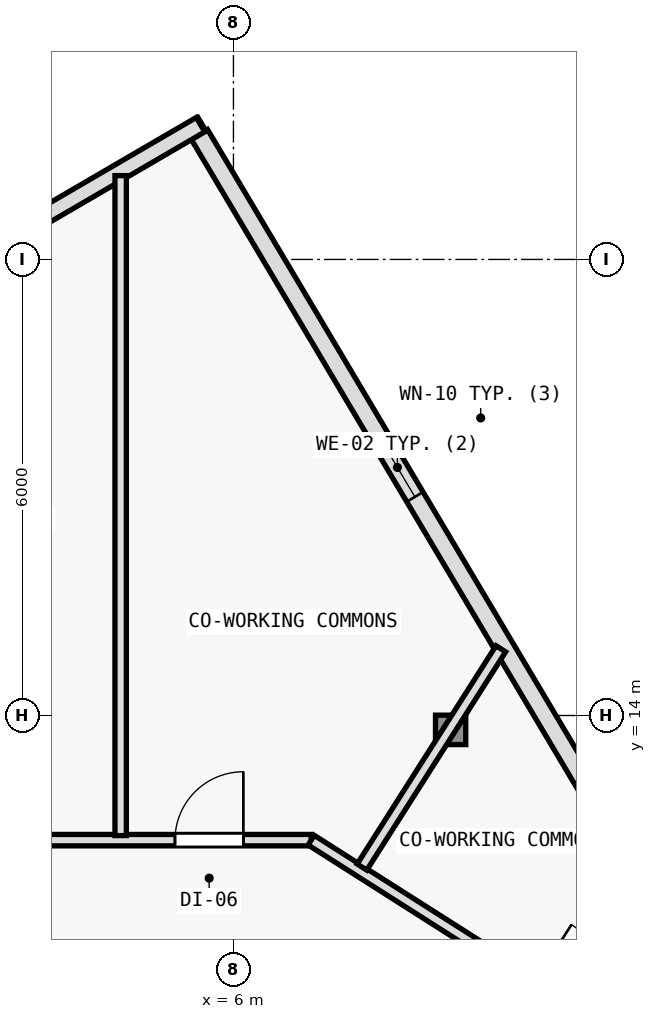
"""IFC4 building model, lengths in metres.
Left out: names, types, materials, properties, quantities, classifications, styles, units other than length and angle.
Written with IfcOpenShell. Run it as: python <this file> out.ifc"""

import sys

from ifc_helpers import new_model, si_unit, direction, frame, frame_2d, origin, origin_2d, place, context, subcontext, project, spatial, rectangle, i_section, extrude, element, fill, save


model = new_model("IFC4")
c1 = context("Model", 3, precision=1e-05, world=origin(), true_north=direction((0.0, 1.0)))
c2 = subcontext(c1, "Body", "Model", "MODEL_VIEW")
j1 = project(units=[si_unit("LENGTHUNIT", "METRE"), si_unit("PLANEANGLEUNIT", "RADIAN")], contexts=[c1])
p1 = place(None, origin())
s1 = spatial("IfcSite", under=j1, at=p1, CompositionType="ELEMENT")
p2 = place(p1, origin())
s2 = spatial("IfcBuilding", under=s1, at=p2, CompositionType="ELEMENT")
p3 = place(p2, frame((0.0, 0.0, 205.5)))
s3 = spatial("IfcBuildingStorey", under=s2, at=p3, CompositionType="ELEMENT", Elevation=205.5)
p4 = place(p3, frame((8.857, 13.811, 0.006), z_axis=(-0.011699840322, -0.002584848443, 0.999928213571), x_axis=(0.215728093413, -0.976453475447, 0.0)))
e1 = element("IfcColumn", 1, at=p4, inside=s3, PredefinedType="COLUMN", context=c2, shape_type="SweptSolid", body=[
    extrude(i_section(OverallWidth=0.398, OverallDepth=0.387, WebThickness=0.013, FlangeThickness=0.022, FilletRadius=0.015, at=origin_2d()), origin(), (0.0, 0.0, 1.0), 3.589),
])
p5 = place(p3, frame((5.551, 21.647, 0.0), z_axis=(0.0, 0.0, 1.0), x_axis=(0.511094988088, -0.859524236512, 0.0)))
e2 = element("IfcWall", 2, at=p5, inside=s3, PredefinedType="SOLIDWALL", context=c2, shape_type="SweptSolid", body=[
    extrude(rectangle(XDim=10.2, YDim=0.25, at=frame_2d((5.1, 0.0))), origin(), (0.0, 0.0, 1.0), 3.35),
])
p6 = place(p5, frame((4.65, 0.0, 0.62)))
e3 = element("IfcOpeningElement", 3, at=p6, cuts=e2, PredefinedType="OPENING", context=c2, shape_type="SweptSolid", body=[
    extrude(rectangle(XDim=0.9, YDim=1.6, at=frame_2d((0.45, 0.8))), frame((0.0, 0.135, 0.0), z_axis=(0.0, -1.0, 0.0), x_axis=(1.0, 0.0, 0.0)), (0.0, 0.0, 1.0), 0.27),
])
p7 = place(p3, frame((1.935, 19.656, 0.0), z_axis=(0.0, 0.0, 1.0), x_axis=(0.863987356641, 0.503513502862, 0.0)))
e4 = element("IfcWall", 4, at=p7, inside=s3, PredefinedType="SOLIDWALL", context=c2, shape_type="SweptSolid", body=[
    extrude(rectangle(XDim=4.204, YDim=0.22, at=frame_2d((2.102, 0.0))), origin(), (0.0, 0.0, 1.0), 3.35),
])
p8 = place(p3, frame((-7.041, 12.36, 0.0), z_axis=(0.0, 0.0, 1.0), x_axis=(1.0, 0.0, 0.0)))
e5 = element("IfcWall", 5, at=p8, inside=s3, PredefinedType="PARTITIONING", context=c2, shape_type="SweptSolid", body=[
    extrude(rectangle(XDim=14.064, YDim=0.15, at=frame_2d((7.032, 0.0))), origin(), (0.0, 0.0, 1.0), 2.975),
])
p9 = place(p8, frame((12.272, 0.0, 0.0)))
e6 = element("IfcOpeningElement", 6, at=p9, cuts=e5, PredefinedType="OPENING", context=c2, shape_type="SweptSolid", body=[
    extrude(rectangle(XDim=0.9, YDim=2.1, at=frame_2d((0.45, 1.05))), frame((0.0, 0.085, 0.0), z_axis=(0.0, -1.0, 0.0), x_axis=(1.0, 0.0, 0.0)), (0.0, 0.0, 1.0), 0.17),
])
p10 = place(p8, frame((9.449, 0.0, 0.0)))
e7 = element("IfcOpeningElement", 7, at=p10, cuts=e5, PredefinedType="OPENING", context=c2, shape_type="SweptSolid", body=[
    extrude(rectangle(XDim=0.9, YDim=2.1, at=frame_2d((0.45, 1.05))), frame((0.0, 0.085, 0.0), z_axis=(0.0, -1.0, 0.0), x_axis=(1.0, 0.0, 0.0)), (0.0, 0.0, 1.0), 0.17),
])
p11 = place(p8, frame((6.614, 0.0, 0.0)))
e8 = element("IfcOpeningElement", 8, at=p11, cuts=e5, PredefinedType="OPENING", context=c2, shape_type="SweptSolid", body=[
    extrude(rectangle(XDim=0.9, YDim=2.1, at=frame_2d((0.45, 1.05))), frame((0.0, 0.085, 0.0), z_axis=(0.0, -1.0, 0.0), x_axis=(1.0, 0.0, 0.0)), (0.0, 0.0, 1.0), 0.17),
])
p12 = place(p8, frame((2.786, 0.0, 0.0)))
e9 = element("IfcOpeningElement", 9, at=p12, cuts=e5, PredefinedType="OPENING", context=c2, shape_type="SweptSolid", body=[
    extrude(rectangle(XDim=0.9, YDim=2.1, at=frame_2d((0.45, 1.05))), frame((0.0, 0.085, 0.0), z_axis=(0.0, -1.0, 0.0), x_axis=(1.0, 0.0, 0.0)), (0.0, 0.0, 1.0), 0.17),
])
p13 = place(p3, frame((7.023, 12.36, 0.0), z_axis=(0.0, 0.0, 1.0), x_axis=(0.84376480085, -0.536713108511, 0.0)))
e10 = element("IfcWall", 10, at=p13, inside=s3, PredefinedType="PARTITIONING", context=c2, shape_type="SweptSolid", body=[
    extrude(rectangle(XDim=7.297, YDim=0.15, at=frame_2d((3.648, 0.0))), origin(), (0.0, 0.0, 1.0), 2.975),
])
p14 = place(p13, frame((3.486, 0.0, 0.0)))
e11 = element("IfcOpeningElement", 11, at=p14, cuts=e10, PredefinedType="OPENING", context=c2, shape_type="SweptSolid", body=[
    extrude(rectangle(XDim=0.9, YDim=2.1, at=frame_2d((0.45, 1.05))), frame((0.0, 0.085, 0.0), z_axis=(0.0, -1.0, 0.0), x_axis=(1.0, 0.0, 0.0)), (0.0, 0.0, 1.0), 0.17),
])
p15 = place(p3, frame((7.691, 12.006, 0.0), z_axis=(0.0, 0.0, 1.0), x_axis=(0.536675875283, 0.843788483501, 0.0)))
e12 = element("IfcWall", 12, at=p15, inside=s3, PredefinedType="PARTITIONING", context=c2, shape_type="SweptSolid", body=[
    extrude(rectangle(XDim=3.403, YDim=0.15, at=frame_2d((1.702, 0.0))), origin(), (0.0, 0.0, 1.0), 2.975),
])
p16 = place(p3, frame((4.516, 12.42, 0.0), z_axis=(0.0, 0.0, 1.0), x_axis=(0.0, 1.0, 0.0)))
e13 = element("IfcWall", 13, at=p16, inside=s3, PredefinedType="PARTITIONING", context=c2, shape_type="SweptSolid", body=[
    extrude(rectangle(XDim=8.683, YDim=0.15, at=frame_2d((4.341, 0.0))), origin(), (0.0, 0.0, 1.0), 2.975),
])
p17 = place(p6, origin())
e14 = element("IfcWindow", 14, at=p17, inside=s3, PartitioningType="SINGLE_PANEL", PredefinedType="WINDOW", context=c2, shape_type="SweptSolid", body=[
    extrude(rectangle(XDim=0.9, YDim=1.6, at=frame_2d((0.45, 0.8))), frame((0.0, 0.03, 0.0), z_axis=(0.0, -1.0, 0.0), x_axis=(1.0, 0.0, 0.0)), (0.0, 0.0, 1.0), 0.06),
])
fill(e3, e14)
p18 = place(p9, origin())
e15 = element("IfcDoor", 15, at=p18, inside=s3, OperationType="SINGLE_SWING_RIGHT", PredefinedType="DOOR", context=c2, shape_type="SweptSolid", body=[
    extrude(rectangle(XDim=0.9, YDim=2.1, at=frame_2d((0.45, 1.05))), frame((0.0, 0.025, 0.0), z_axis=(0.0, -1.0, 0.0), x_axis=(1.0, 0.0, 0.0)), (0.0, 0.0, 1.0), 0.05),
])
fill(e6, e15)
save(model, sys.argv[1])
